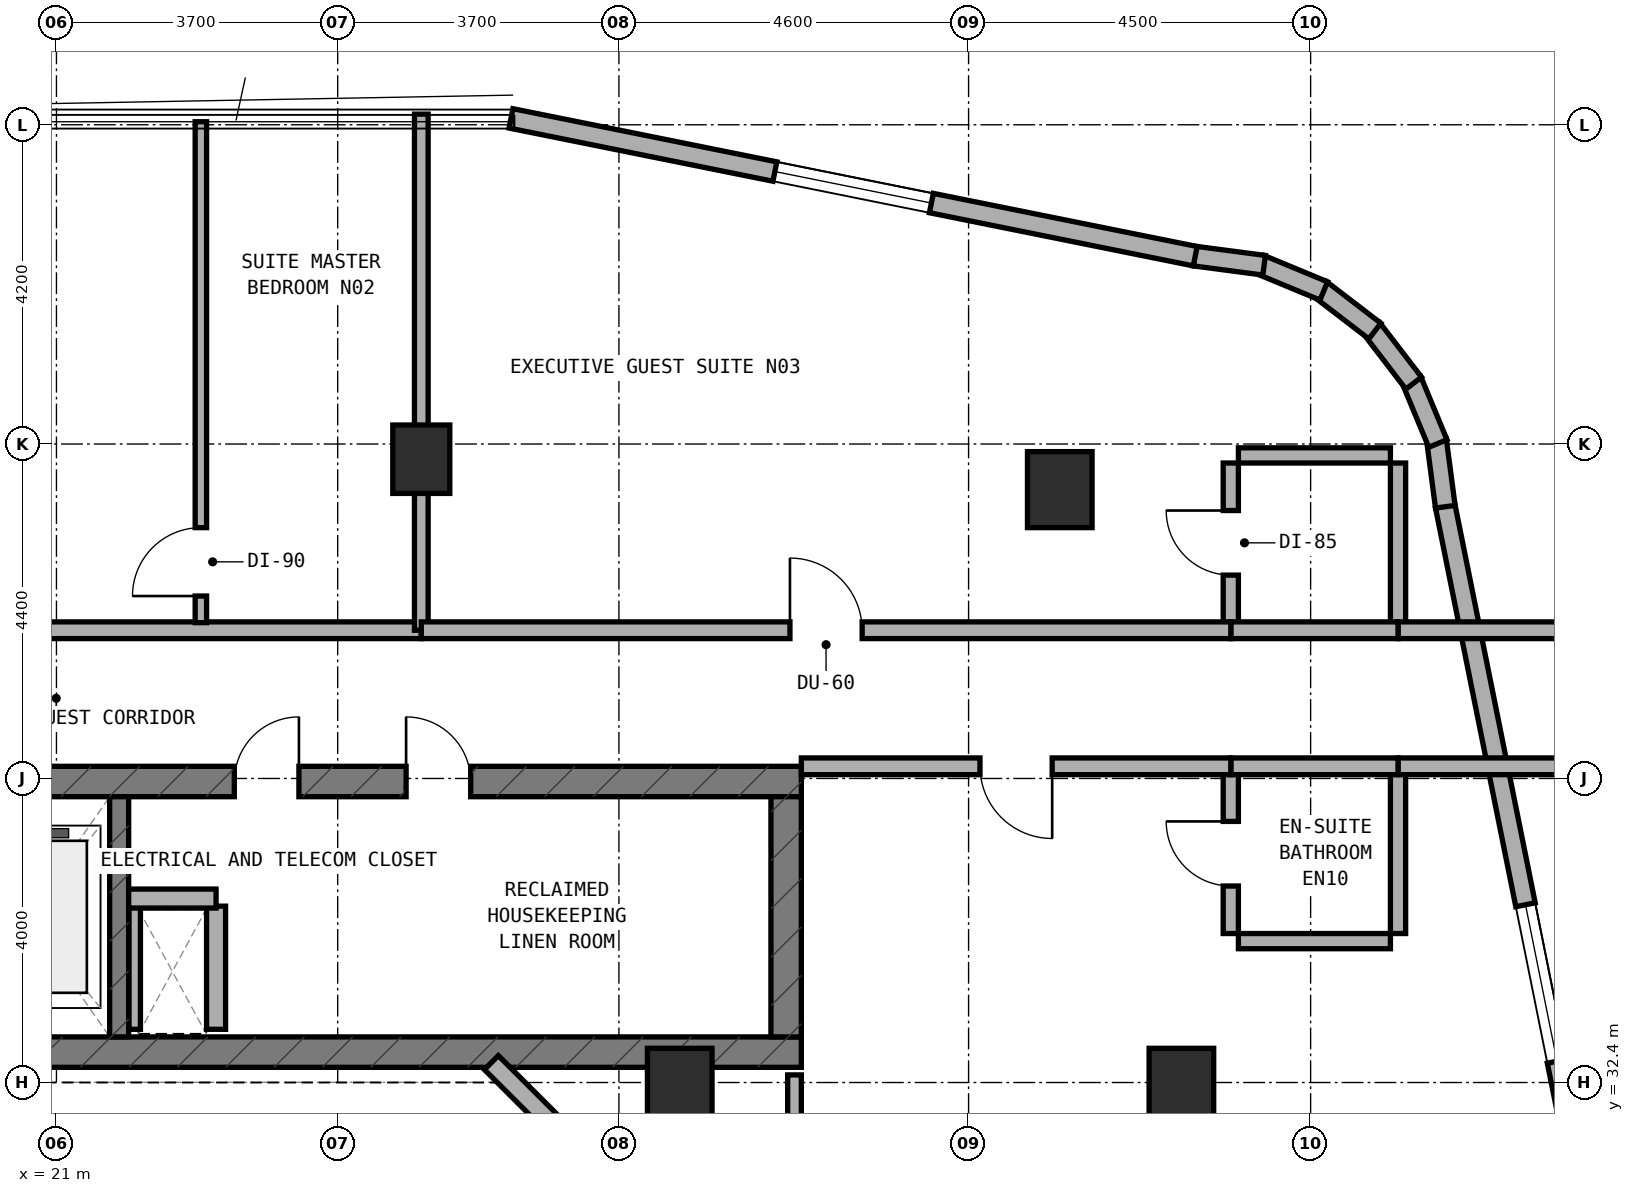
"""IFC4 building model, lengths in metres.
Left out: names, types, materials, properties, quantities, classifications, styles, units other than length and angle.
Written with IfcOpenShell. Run it as: python <this file> out.ifc"""

import sys

from ifc_helpers import new_model, si_unit, direction, frame, frame_2d, origin, origin_2d, place, context, subcontext, project, spatial, rectangle, extrude, element, fill, save


model = new_model("IFC4")
c1 = context("Model", 3, precision=1e-05, world=origin(), true_north=direction((0.0, 1.0)))
c2 = subcontext(c1, "Body", "Model", "MODEL_VIEW")
j1 = project(units=[si_unit("LENGTHUNIT", "METRE"), si_unit("PLANEANGLEUNIT", "RADIAN")], contexts=[c1])
p1 = place(None, origin())
s1 = spatial("IfcSite", under=j1, at=p1, CompositionType="ELEMENT")
p2 = place(p1, origin())
s2 = spatial("IfcBuilding", under=s1, at=p2, CompositionType="ELEMENT")
p3 = place(p2, frame((0.0, 0.0, 138.0)))
s3 = spatial("IfcBuildingStorey", under=s2, at=p3, CompositionType="ELEMENT", Elevation=138.0)
p4 = place(p3, frame((6.4, 32.8, 0.0), z_axis=(0.0, 0.0, 1.0), x_axis=(1.0, 0.0, 0.0)))
e1 = element("IfcWall", 1, at=p4, inside=s3, PredefinedType="SHEAR", context=c2, shape_type="SweptSolid", body=[
    extrude(rectangle(XDim=24.4, YDim=0.4, at=frame_2d((12.2, 0.0))), origin(), (0.0, 0.0, 1.0), 3.5),
])
p5 = place(p4, frame((6.05, 0.0, 0.0)))
e2 = element("IfcOpeningElement", 2, at=p5, cuts=e1, PredefinedType="OPENING", context=c2, shape_type="SweptSolid", body=[
    extrude(rectangle(XDim=1.1, YDim=2.15, at=frame_2d((0.55, 1.075))), frame((0.0, 0.21, 0.0), z_axis=(0.0, -1.0, 0.0), x_axis=(1.0, 0.0, 0.0)), (0.0, 0.0, 1.0), 0.42),
])
p6 = place(p3, frame((6.4, 36.36, 0.0), z_axis=(0.0, 0.0, 1.0), x_axis=(1.0, 0.0, 0.0)))
e3 = element("IfcWall", 3, at=p6, inside=s3, PredefinedType="SHEAR", context=c2, shape_type="SweptSolid", body=[
    extrude(rectangle(XDim=24.4, YDim=0.4, at=frame_2d((12.2, 0.0))), origin(), (0.0, 0.0, 1.0), 3.5),
])
p7 = place(p6, frame((9.15, 0.0, 0.0)))
e4 = element("IfcOpeningElement", 4, at=p7, cuts=e3, PredefinedType="OPENING", context=c2, shape_type="SweptSolid", body=[
    extrude(rectangle(XDim=1.2, YDim=2.15, at=frame_2d((0.6, 1.075))), frame((0.0, 0.21, 0.0), z_axis=(0.0, -1.0, 0.0), x_axis=(1.0, 0.0, 0.0)), (0.0, 0.0, 1.0), 0.42),
])
p8 = place(p6, frame((19.2, 0.0, 0.0)))
e5 = element("IfcOpeningElement", 5, at=p8, cuts=e3, PredefinedType="OPENING", context=c2, shape_type="SweptSolid", body=[
    extrude(rectangle(XDim=0.85, YDim=2.1, at=frame_2d((0.425, 1.05))), frame((0.0, 0.21, 0.0), z_axis=(0.0, -1.0, 0.0), x_axis=(1.0, 0.0, 0.0)), (0.0, 0.0, 1.0), 0.42),
])
p9 = place(p6, frame((16.94, 0.0, 0.0)))
e6 = element("IfcOpeningElement", 6, at=p9, cuts=e3, PredefinedType="OPENING", context=c2, shape_type="SweptSolid", body=[
    extrude(rectangle(XDim=0.85, YDim=2.1, at=frame_2d((0.425, 1.05))), frame((0.0, 0.21, 0.0), z_axis=(0.0, -1.0, 0.0), x_axis=(1.0, 0.0, 0.0)), (0.0, 0.0, 1.0), 0.42),
])
p10 = place(p3, frame((30.6, 33.0, 0.0), z_axis=(0.0, 0.0, 1.0), x_axis=(0.0, 1.0, 0.0)))
e7 = element("IfcWall", 7, at=p10, inside=s3, PredefinedType="SHEAR", context=c2, shape_type="SweptSolid", body=[
    extrude(rectangle(XDim=3.16, YDim=0.4, at=frame_2d((1.58, 0.0))), origin(), (0.0, 0.0, 1.0), 3.5),
])
p11 = place(p3, frame((21.825, 33.0, 0.0), z_axis=(0.0, 0.0, 1.0), x_axis=(0.0, 1.0, 0.0)))
e8 = element("IfcWall", 8, at=p11, inside=s3, PredefinedType="STANDARD", context=c2, shape_type="SweptSolid", body=[
    extrude(rectangle(XDim=3.16, YDim=0.25, at=frame_2d((1.58, 0.0))), origin(), (0.0, 0.0, 1.0), 3.22),
])
p12 = place(p3, frame((25.8, 40.6, 0.0), z_axis=(0.0, 0.0, 1.0), x_axis=(1.0, 0.0, 0.0)))
e9 = element("IfcColumn", 9, at=p12, inside=s3, PredefinedType="COLUMN", context=c2, shape_type="SweptSolid", body=[
    extrude(rectangle(XDim=0.75, YDim=0.9, at=origin_2d()), origin(), (0.0, 0.0, 1.0), 3.5),
])
for number, where, z_axis, x_axis in (
    (10, (34.2, 40.2, 0.0), (0.0, 0.0, 1.0), (1.0, 0.0, 0.0)),
    (11, (35.8, 32.35, 0.0), (0.0, 0.0, 1.0), (1.0, 0.0, 0.0)),
    (12, (29.2, 32.35, 0.0), (0.0, 0.0, 1.0), (1.0, 0.0, 0.0)),
):
    element("IfcColumn", number, at=place(p3, frame(where, z_axis=z_axis, x_axis=x_axis)), inside=s3, PredefinedType="COLUMN", context=c2, shape_type="SweptSolid", body=[
        extrude(rectangle(XDim=0.85, YDim=1.0, at=origin_2d()), origin(), (0.0, 0.0, 1.0), 3.5),
    ])
p13 = place(p3, frame((41.084, 30.98, 0.0), z_axis=(0.0, 0.0, 1.0), x_axis=(-0.197435082048, 0.980315963543, 0.0)))
e13 = element("IfcWall", 13, at=p13, inside=s3, PredefinedType="STANDARD", context=c2, shape_type="SweptSolid", body=[
    extrude(rectangle(XDim=9.183, YDim=0.26, at=frame_2d((4.591, 0.0))), origin(), (0.0, 0.0, 1.0), 3.22),
])
p14 = place(p13, frame((1.734, 0.0, 0.85)))
e14 = element("IfcOpeningElement", 14, at=p14, cuts=e13, PredefinedType="OPENING", context=c2, shape_type="SweptSolid", body=[
    extrude(rectangle(XDim=2.1, YDim=1.5, at=frame_2d((1.05, 0.75))), frame((0.0, 0.14, 0.0), z_axis=(0.0, -1.0, 0.0), x_axis=(1.0, 0.0, 0.0)), (0.0, 0.0, 1.0), 0.28),
])
p15 = place(p3, frame((39.272, 39.975, 0.0), z_axis=(0.0, 0.0, 1.0), x_axis=(-0.130953706898, 0.991388484223, 0.0)))
e15 = element("IfcWall", 15, at=p15, inside=s3, PredefinedType="STANDARD", context=c2, shape_type="SweptSolid", body=[
    extrude(rectangle(XDim=0.885, YDim=0.26, at=frame_2d((0.443, 0.0))), origin(), (0.0, 0.0, 1.0), 3.22),
])
p16 = place(p3, frame((39.174, 40.807, 0.0), z_axis=(0.0, 0.0, 1.0), x_axis=(-0.383290660547, 0.923627776508, 0.0)))
e16 = element("IfcWall", 16, at=p16, inside=s3, PredefinedType="STANDARD", context=c2, shape_type="SweptSolid", body=[
    extrude(rectangle(XDim=0.903, YDim=0.26, at=frame_2d((0.452, 0.0))), origin(), (0.0, 0.0, 1.0), 3.22),
])
p17 = place(p3, frame((38.856, 41.601, 0.0), z_axis=(0.0, 0.0, 1.0), x_axis=(-0.608624690463, 0.793458244748, 0.0)))
e17 = element("IfcWall", 17, at=p17, inside=s3, PredefinedType="STANDARD", context=c2, shape_type="SweptSolid", body=[
    extrude(rectangle(XDim=0.902, YDim=0.26, at=frame_2d((0.451, 0.0))), origin(), (0.0, 0.0, 1.0), 3.22),
])
p18 = place(p3, frame((38.345, 42.286, 0.0), z_axis=(0.0, 0.0, 1.0), x_axis=(-0.793558456666, 0.608494022858, 0.0)))
e18 = element("IfcWall", 18, at=p18, inside=s3, PredefinedType="STANDARD", context=c2, shape_type="SweptSolid", body=[
    extrude(rectangle(XDim=0.902, YDim=0.26, at=frame_2d((0.451, 0.0))), origin(), (0.0, 0.0, 1.0), 3.22),
])
p19 = place(p3, frame((37.673, 42.814, 0.0), z_axis=(0.0, 0.0, 1.0), x_axis=(-0.923683767999, 0.383155708213, 0.0)))
e19 = element("IfcWall", 19, at=p19, inside=s3, PredefinedType="STANDARD", context=c2, shape_type="SweptSolid", body=[
    extrude(rectangle(XDim=0.903, YDim=0.26, at=frame_2d((0.451, 0.0))), origin(), (0.0, 0.0, 1.0), 3.22),
])
p20 = place(p3, frame((36.888, 43.152, 0.0), z_axis=(0.0, 0.0, 1.0), x_axis=(-0.991487658083, 0.130200706103, 0.0)))
e20 = element("IfcWall", 20, at=p20, inside=s3, PredefinedType="STANDARD", context=c2, shape_type="SweptSolid", body=[
    extrude(rectangle(XDim=0.921, YDim=0.26, at=frame_2d((0.46, 0.0))), origin(), (0.0, 0.0, 1.0), 3.22),
])
p21 = place(p3, frame((35.982, 43.271, 0.0), z_axis=(0.0, 0.0, 1.0), x_axis=(-0.980315963543, 0.197435082048, 0.0)))
e21 = element("IfcWall", 21, at=p21, inside=s3, PredefinedType="STANDARD", context=c2, shape_type="SweptSolid", body=[
    extrude(rectangle(XDim=9.183, YDim=0.26, at=frame_2d((4.591, 0.0))), origin(), (0.0, 0.0, 1.0), 3.22),
])
p22 = place(p21, frame((3.541, 0.0, 0.85)))
e22 = element("IfcOpeningElement", 22, at=p22, cuts=e21, PredefinedType="OPENING", context=c2, shape_type="SweptSolid", body=[
    extrude(rectangle(XDim=2.1, YDim=1.5, at=frame_2d((1.05, 0.75))), frame((0.0, 0.14, 0.0), z_axis=(0.0, -1.0, 0.0), x_axis=(1.0, 0.0, 0.0)), (0.0, 0.0, 1.0), 0.28),
])
p23 = place(p3, frame((28.556, 30.828, 0.0), z_axis=(0.0, 0.0, 1.0), x_axis=(-0.707059717605, 0.707153841636, 0.0)))
e23 = element("IfcWall", 23, at=p23, inside=s3, PredefinedType="STANDARD", context=c2, shape_type="SweptSolid", body=[
    extrude(rectangle(XDim=2.594, YDim=0.26, at=frame_2d((1.297, 0.0))), origin(), (0.0, 0.0, 1.0), 3.22),
])
p24 = place(p3, frame((22.03, 33.1, 0.0), z_axis=(0.0, 0.0, 1.0), x_axis=(0.0, 1.0, 0.0)))
e24 = element("IfcWall", 24, at=p24, inside=s3, PredefinedType="PARTITIONING", context=c2, shape_type="SweptSolid", body=[
    extrude(rectangle(XDim=1.62, YDim=0.15, at=frame_2d((0.81, 0.0))), origin(), (0.0, 0.0, 1.0), 3.22),
])
p25 = place(p3, frame((23.1, 33.1, 0.0), z_axis=(0.0, 0.0, 1.0), x_axis=(0.0, 1.0, 0.0)))
e25 = element("IfcWall", 25, at=p25, inside=s3, PredefinedType="SOLIDWALL", context=c2, shape_type="SweptSolid", body=[
    extrude(rectangle(XDim=1.62, YDim=0.25, at=frame_2d((0.81, 0.0))), origin(), (0.0, 0.0, 1.0), 3.22),
])
p26 = place(p3, frame((21.95, 34.82, 0.0), z_axis=(0.0, 0.0, 1.0), x_axis=(1.0, 0.0, 0.0)))
e26 = element("IfcWall", 26, at=p26, inside=s3, PredefinedType="SOLIDWALL", context=c2, shape_type="SweptSolid", body=[
    extrude(rectangle(XDim=1.15, YDim=0.25, at=frame_2d((0.575, 0.0))), origin(), (0.0, 0.0, 1.0), 3.22),
])
p27 = place(p3, frame((13.8, 38.35, 0.0), z_axis=(0.0, 0.0, 1.0), x_axis=(1.0, 0.0, 0.0)))
e27 = element("IfcWall", 27, at=p27, inside=s3, PredefinedType="SOLIDWALL", context=c2, shape_type="SweptSolid", body=[
    extrude(rectangle(XDim=12.0, YDim=0.22, at=frame_2d((6.0, 0.0))), origin(), (0.0, 0.0, 1.0), 2.695),
])
p28 = place(p27, frame((5.525, 0.0, 0.0)))
e28 = element("IfcOpeningElement", 28, at=p28, cuts=e27, PredefinedType="OPENING", context=c2, shape_type="SweptSolid", body=[
    extrude(rectangle(XDim=0.95, YDim=2.1, at=frame_2d((0.475, 1.05))), frame((0.0, 0.12, 0.0), z_axis=(0.0, -1.0, 0.0), x_axis=(1.0, 0.0, 0.0)), (0.0, 0.0, 1.0), 0.24),
])
p29 = place(p3, frame((22.9, 38.45, 0.0), z_axis=(0.0, 0.0, 1.0), x_axis=(0.0, 1.0, 0.0)))
e29 = element("IfcWall", 29, at=p29, inside=s3, PredefinedType="PARTITIONING", context=c2, shape_type="SweptSolid", body=[
    extrude(rectangle(XDim=6.59, YDim=0.15, at=frame_2d((3.295, 0.0))), origin(), (0.0, 0.0, 1.0), 2.835),
])
p30 = place(p29, frame((0.35, 0.0, 0.0)))
e30 = element("IfcOpeningElement", 30, at=p30, cuts=e29, PredefinedType="OPENING", context=c2, shape_type="SweptSolid", body=[
    extrude(rectangle(XDim=0.9, YDim=2.1, at=frame_2d((0.45, 1.05))), frame((0.0, 0.085, 0.0), z_axis=(0.0, -1.0, 0.0), x_axis=(1.0, 0.0, 0.0)), (0.0, 0.0, 1.0), 0.17),
])
p31 = place(p3, frame((25.8, 38.35, 0.0), z_axis=(0.0, 0.0, 1.0), x_axis=(0.0, 1.0, 0.0)))
e31 = element("IfcWall", 31, at=p31, inside=s3, PredefinedType="SOLIDWALL", context=c2, shape_type="SweptSolid", body=[
    extrude(rectangle(XDim=6.79, YDim=0.18, at=frame_2d((3.395, 0.0))), origin(), (0.0, 0.0, 1.0), 2.695),
])
p32 = place(p3, frame((36.45, 38.45, 0.0), z_axis=(0.0, 0.0, 1.0), x_axis=(0.0, 1.0, 0.0)))
e32 = element("IfcWall", 32, at=p32, inside=s3, PredefinedType="PLUMBINGWALL", context=c2, shape_type="SweptSolid", body=[
    extrude(rectangle(XDim=2.1, YDim=0.2, at=frame_2d((1.05, 0.0))), origin(), (0.0, 0.0, 1.0), 3.22),
])
p33 = place(p32, frame((0.625, 0.0, 0.0)))
e33 = element("IfcOpeningElement", 33, at=p33, cuts=e32, PredefinedType="OPENING", context=c2, shape_type="SweptSolid", body=[
    extrude(rectangle(XDim=0.85, YDim=2.1, at=frame_2d((0.425, 1.05))), frame((0.0, 0.11, 0.0), z_axis=(0.0, -1.0, 0.0), x_axis=(1.0, 0.0, 0.0)), (0.0, 0.0, 1.0), 0.22),
])
p34 = place(p3, frame((36.55, 40.65, 0.0), z_axis=(0.0, 0.0, 1.0), x_axis=(1.0, 0.0, 0.0)))
e34 = element("IfcWall", 34, at=p34, inside=s3, PredefinedType="PLUMBINGWALL", context=c2, shape_type="SweptSolid", body=[
    extrude(rectangle(XDim=2.0, YDim=0.2, at=frame_2d((1.0, 0.0))), origin(), (0.0, 0.0, 1.0), 3.22),
])
p35 = place(p3, frame((38.65, 38.45, 0.0), z_axis=(0.0, 0.0, 1.0), x_axis=(0.0, 1.0, 0.0)))
e35 = element("IfcWall", 35, at=p35, inside=s3, PredefinedType="PLUMBINGWALL", context=c2, shape_type="SweptSolid", body=[
    extrude(rectangle(XDim=2.1, YDim=0.2, at=frame_2d((1.05, 0.0))), origin(), (0.0, 0.0, 1.0), 3.22),
])
p36 = place(p3, frame((38.65, 38.35, 0.0), z_axis=(0.0, 0.0, 1.0), x_axis=(1.0, 0.0, 0.0)))
e36 = element("IfcWall", 36, at=p36, inside=s3, PredefinedType="SOLIDWALL", context=c2, shape_type="SweptSolid", body=[
    extrude(rectangle(XDim=2.39, YDim=0.22, at=frame_2d((1.195, 0.0))), origin(), (0.0, 0.0, 1.0), 3.22),
])
p37 = place(p3, frame((36.45, 38.35, 0.0), z_axis=(0.0, 0.0, 1.0), x_axis=(1.0, 0.0, 0.0)))
e37 = element("IfcWall", 37, at=p37, inside=s3, PredefinedType="SOLIDWALL", context=c2, shape_type="SweptSolid", body=[
    extrude(rectangle(XDim=2.2, YDim=0.22, at=frame_2d((1.1, 0.0))), origin(), (0.0, 0.0, 1.0), 3.22),
])
p38 = place(p3, frame((25.8, 38.35, 0.0), z_axis=(0.0, 0.0, 1.0), x_axis=(1.0, 0.0, 0.0)))
e38 = element("IfcWall", 38, at=p38, inside=s3, PredefinedType="SOLIDWALL", context=c2, shape_type="SweptSolid", body=[
    extrude(rectangle(XDim=10.65, YDim=0.22, at=frame_2d((5.325, 0.0))), origin(), (0.0, 0.0, 1.0), 2.695),
])
p39 = place(p38, frame((4.85, 0.0, 0.0)))
e39 = element("IfcOpeningElement", 39, at=p39, cuts=e38, PredefinedType="OPENING", context=c2, shape_type="SweptSolid", body=[
    extrude(rectangle(XDim=0.95, YDim=2.1, at=frame_2d((0.475, 1.05))), frame((0.0, 0.12, 0.0), z_axis=(0.0, -1.0, 0.0), x_axis=(1.0, 0.0, 0.0)), (0.0, 0.0, 1.0), 0.24),
])
p40 = place(p3, frame((30.71, 17.5, 0.0), z_axis=(0.0, 0.0, 1.0), x_axis=(0.0, 1.0, 0.0)))
e40 = element("IfcWall", 40, at=p40, inside=s3, PredefinedType="SOLIDWALL", context=c2, shape_type="SweptSolid", body=[
    extrude(rectangle(XDim=15.0, YDim=0.18, at=frame_2d((7.5, 0.0))), origin(), (0.0, 0.0, 1.0), 2.695),
])
p41 = place(p3, frame((36.45, 34.36, 0.0), z_axis=(0.0, 0.0, 1.0), x_axis=(0.0, 1.0, 0.0)))
e41 = element("IfcWall", 41, at=p41, inside=s3, PredefinedType="PLUMBINGWALL", context=c2, shape_type="SweptSolid", body=[
    extrude(rectangle(XDim=2.1, YDim=0.2, at=frame_2d((1.05, 0.0))), origin(), (0.0, 0.0, 1.0), 3.22),
])
p42 = place(p41, frame((0.625, 0.0, 0.0)))
e42 = element("IfcOpeningElement", 42, at=p42, cuts=e41, PredefinedType="OPENING", context=c2, shape_type="SweptSolid", body=[
    extrude(rectangle(XDim=0.85, YDim=2.1, at=frame_2d((0.425, 1.05))), frame((0.0, 0.11, 0.0), z_axis=(0.0, -1.0, 0.0), x_axis=(1.0, 0.0, 0.0)), (0.0, 0.0, 1.0), 0.22),
])
p43 = place(p3, frame((36.55, 34.26, 0.0), z_axis=(0.0, 0.0, 1.0), x_axis=(1.0, 0.0, 0.0)))
e43 = element("IfcWall", 43, at=p43, inside=s3, PredefinedType="PLUMBINGWALL", context=c2, shape_type="SweptSolid", body=[
    extrude(rectangle(XDim=2.0, YDim=0.2, at=frame_2d((1.0, 0.0))), origin(), (0.0, 0.0, 1.0), 3.22),
])
p44 = place(p3, frame((38.65, 34.36, 0.0), z_axis=(0.0, 0.0, 1.0), x_axis=(0.0, 1.0, 0.0)))
e44 = element("IfcWall", 44, at=p44, inside=s3, PredefinedType="PLUMBINGWALL", context=c2, shape_type="SweptSolid", body=[
    extrude(rectangle(XDim=2.1, YDim=0.2, at=frame_2d((1.05, 0.0))), origin(), (0.0, 0.0, 1.0), 3.22),
])
p45 = place(p3, frame((38.65, 36.56, 0.0), z_axis=(0.0, 0.0, 1.0), x_axis=(1.0, 0.0, 0.0)))
e45 = element("IfcWall", 45, at=p45, inside=s3, PredefinedType="SOLIDWALL", context=c2, shape_type="SweptSolid", body=[
    extrude(rectangle(XDim=2.55, YDim=0.22, at=frame_2d((1.275, 0.0))), origin(), (0.0, 0.0, 1.0), 3.22),
])
p46 = place(p3, frame((36.45, 36.56, 0.0), z_axis=(0.0, 0.0, 1.0), x_axis=(1.0, 0.0, 0.0)))
e46 = element("IfcWall", 46, at=p46, inside=s3, PredefinedType="SOLIDWALL", context=c2, shape_type="SweptSolid", body=[
    extrude(rectangle(XDim=2.2, YDim=0.22, at=frame_2d((1.1, 0.0))), origin(), (0.0, 0.0, 1.0), 3.22),
])
p47 = place(p3, frame((30.8, 36.56, 0.0), z_axis=(0.0, 0.0, 1.0), x_axis=(1.0, 0.0, 0.0)))
e47 = element("IfcWall", 47, at=p47, inside=s3, PredefinedType="SOLIDWALL", context=c2, shape_type="SweptSolid", body=[
    extrude(rectangle(XDim=5.65, YDim=0.22, at=frame_2d((2.825, 0.0))), origin(), (0.0, 0.0, 1.0), 2.695),
])
p48 = place(p47, frame((2.35, 0.0, 0.0)))
e48 = element("IfcOpeningElement", 48, at=p48, cuts=e47, PredefinedType="OPENING", context=c2, shape_type="SweptSolid", body=[
    extrude(rectangle(XDim=0.95, YDim=2.1, at=frame_2d((0.475, 1.05))), frame((0.0, 0.12, 0.0), z_axis=(0.0, -1.0, 0.0), x_axis=(1.0, 0.0, 0.0)), (0.0, 0.0, 1.0), 0.24),
])
p49 = place(p14, origin())
e49 = element("IfcWindow", 49, at=p49, inside=s3, PartitioningType="SINGLE_PANEL", PredefinedType="WINDOW", context=c2, shape_type="SweptSolid", body=[
    extrude(rectangle(XDim=2.1, YDim=1.5, at=frame_2d((1.05, 0.75))), frame((0.0, 0.03, 0.0), z_axis=(0.0, -1.0, 0.0), x_axis=(1.0, 0.0, 0.0)), (0.0, 0.0, 1.0), 0.06),
])
fill(e14, e49)
p50 = place(p22, origin())
e50 = element("IfcWindow", 50, at=p50, inside=s3, PartitioningType="SINGLE_PANEL", PredefinedType="WINDOW", context=c2, shape_type="SweptSolid", body=[
    extrude(rectangle(XDim=2.1, YDim=1.5, at=frame_2d((1.05, 0.75))), frame((0.0, 0.03, 0.0), z_axis=(0.0, -1.0, 0.0), x_axis=(1.0, 0.0, 0.0)), (0.0, 0.0, 1.0), 0.06),
])
fill(e22, e50)
p51 = place(p8, origin())
e51 = element("IfcDoor", 51, at=p51, inside=s3, OperationType="SINGLE_SWING_LEFT", PredefinedType="DOOR", context=c2, shape_type="SweptSolid", body=[
    extrude(rectangle(XDim=0.85, YDim=2.1, at=frame_2d((0.425, 1.05))), frame((0.0, 0.025, 0.0), z_axis=(0.0, -1.0, 0.0), x_axis=(1.0, 0.0, 0.0)), (0.0, 0.0, 1.0), 0.05),
])
fill(e5, e51)
p52 = place(p9, origin())
e52 = element("IfcDoor", 52, at=p52, inside=s3, OperationType="SINGLE_SWING_RIGHT", PredefinedType="DOOR", context=c2, shape_type="SweptSolid", body=[
    extrude(rectangle(XDim=0.85, YDim=2.1, at=frame_2d((0.425, 1.05))), frame((0.0, 0.025, 0.0), z_axis=(0.0, -1.0, 0.0), x_axis=(1.0, 0.0, 0.0)), (0.0, 0.0, 1.0), 0.05),
])
fill(e6, e52)
p53 = place(p30, origin())
e53 = element("IfcDoor", 53, at=p53, inside=s3, OperationType="SINGLE_SWING_LEFT", PredefinedType="DOOR", context=c2, shape_type="SweptSolid", body=[
    extrude(rectangle(XDim=0.9, YDim=2.1, at=frame_2d((0.45, 1.05))), frame((0.0, 0.025, 0.0), z_axis=(0.0, -1.0, 0.0), x_axis=(1.0, 0.0, 0.0)), (0.0, 0.0, 1.0), 0.05),
])
fill(e30, e53)
p54 = place(p33, origin())
e54 = element("IfcDoor", 54, at=p54, inside=s3, OperationType="SINGLE_SWING_RIGHT", PredefinedType="DOOR", context=c2, shape_type="SweptSolid", body=[
    extrude(rectangle(XDim=0.85, YDim=2.1, at=frame_2d((0.425, 1.05))), frame((0.0, 0.025, 0.0), z_axis=(0.0, -1.0, 0.0), x_axis=(1.0, 0.0, 0.0)), (0.0, 0.0, 1.0), 0.05),
])
fill(e33, e54)
p55 = place(p39, origin())
e55 = element("IfcDoor", 55, at=p55, inside=s3, OperationType="SINGLE_SWING_LEFT", PredefinedType="DOOR", context=c2, shape_type="SweptSolid", body=[
    extrude(rectangle(XDim=0.95, YDim=2.1, at=frame_2d((0.475, 1.05))), frame((0.0, 0.025, 0.0), z_axis=(0.0, -1.0, 0.0), x_axis=(1.0, 0.0, 0.0)), (0.0, 0.0, 1.0), 0.05),
])
fill(e39, e55)
p56 = place(p42, origin())
e56 = element("IfcDoor", 56, at=p56, inside=s3, OperationType="SINGLE_SWING_RIGHT", PredefinedType="DOOR", context=c2, shape_type="SweptSolid", body=[
    extrude(rectangle(XDim=0.85, YDim=2.1, at=frame_2d((0.425, 1.05))), frame((0.0, 0.025, 0.0), z_axis=(0.0, -1.0, 0.0), x_axis=(1.0, 0.0, 0.0)), (0.0, 0.0, 1.0), 0.05),
])
fill(e42, e56)
p57 = place(p48, frame((0.95, 0.0, 0.0), z_axis=(0.0, 0.0, 1.0), x_axis=(-1.0, 0.0, 0.0)))
e57 = element("IfcDoor", 57, at=p57, inside=s3, OperationType="SINGLE_SWING_LEFT", PredefinedType="DOOR", context=c2, shape_type="SweptSolid", body=[
    extrude(rectangle(XDim=0.95, YDim=2.1, at=frame_2d((0.475, 1.05))), frame((0.0, 0.025, 0.0), z_axis=(0.0, -1.0, 0.0), x_axis=(1.0, 0.0, 0.0)), (0.0, 0.0, 1.0), 0.05),
])
fill(e48, e57)
save(model, sys.argv[1])
